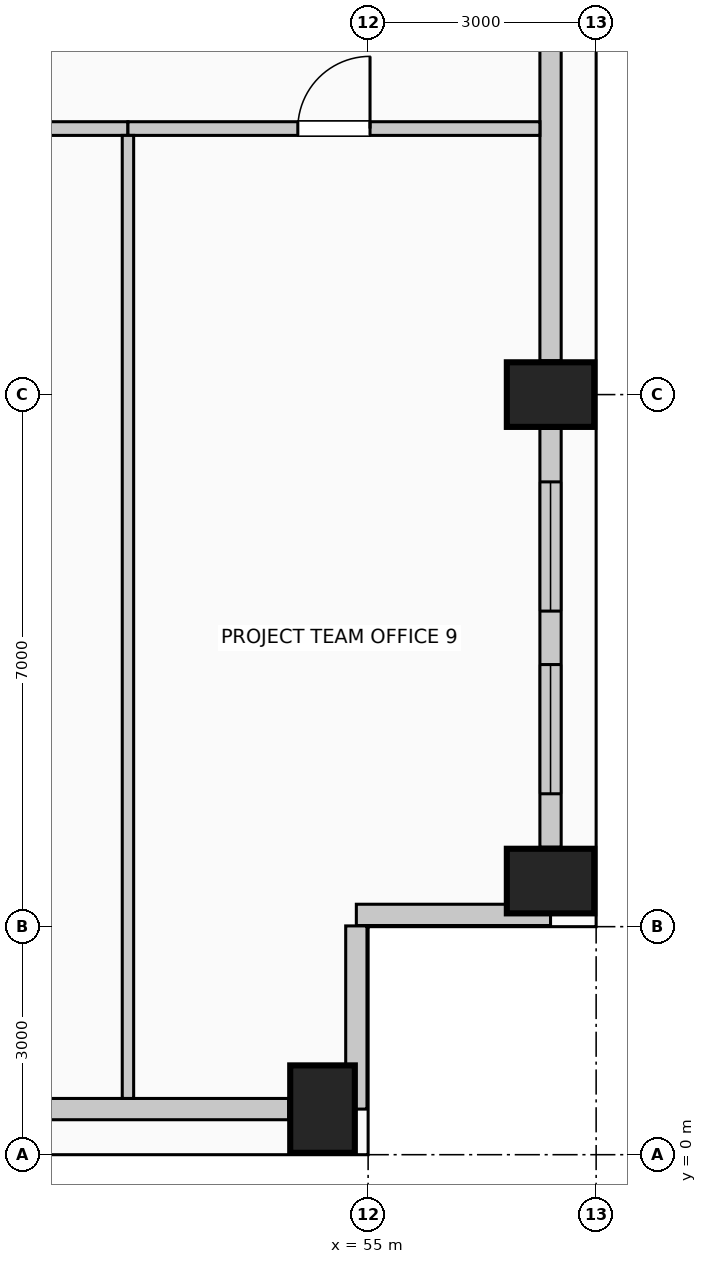
"""IFC4 building model, lengths in metres.
Left out: names, types, materials, properties, quantities, classifications, styles, units other than length and angle.
Written with IfcOpenShell. Run it as: python <this file> out.ifc"""

import sys

from ifc_helpers import new_model, si_unit, direction, frame, frame_2d, origin, origin_2d, place, context, subcontext, project, spatial, rectangle, extrude, element, fill, save


model = new_model("IFC4")
c1 = context("Model", 3, precision=1e-05, world=origin(), true_north=direction((0.0, 1.0)))
c2 = subcontext(c1, "Body", "Model", "MODEL_VIEW")
j1 = project(units=[si_unit("LENGTHUNIT", "METRE"), si_unit("PLANEANGLEUNIT", "RADIAN")], contexts=[c1])
p1 = place(None, origin())
s1 = spatial("IfcSite", under=j1, at=p1, CompositionType="ELEMENT")
p2 = place(p1, origin())
s2 = spatial("IfcBuilding", under=s1, at=p2, CompositionType="ELEMENT")
p3 = place(p2, frame((0.0, 0.0, 152.6)))
s3 = spatial("IfcBuildingStorey", under=s2, at=p3, CompositionType="ELEMENT", Elevation=152.6)
for number, where, z_axis, x_axis in (
    (1, (54.4, 0.6, 0.0), (0.0, 0.0, 1.0), (1.0, 0.0, 0.0)),
    (2, (57.4, 3.6, 0.0), (0.0, 0.0, 1.0), (0.0, 1.0, 0.0)),
    (3, (57.4, 10.0, 0.0), (0.0, 0.0, 1.0), (0.0, 1.0, 0.0)),
):
    element("IfcColumn", number, at=place(p3, frame(where, z_axis=z_axis, x_axis=x_axis)), inside=s3, PredefinedType="COLUMN", context=c2, shape_type="SweptSolid", body=[
        extrude(rectangle(XDim=0.85, YDim=1.15, at=origin_2d()), origin(), (0.0, 0.0, 1.0), 4.0),
    ])
p4 = place(p3, frame((53.955, 0.6, 0.0), z_axis=(0.0, 0.0, 1.0), x_axis=(-1.0, 0.0, 0.0)))
e4 = element("IfcWall", 4, at=p4, inside=s3, PredefinedType="SOLIDWALL", context=c2, shape_type="SweptSolid", body=[
    extrude(rectangle(XDim=4.01, YDim=0.28, at=frame_2d((2.005, 0.0))), origin(), (0.0, 0.0, 1.0), 2.875),
])
p5 = place(p3, frame((57.4, 9.555, 0.0), z_axis=(0.0, 0.0, 1.0), x_axis=(0.0, -1.0, 0.0)))
e5 = element("IfcWall", 5, at=p5, inside=s3, PredefinedType="SOLIDWALL", context=c2, shape_type="SweptSolid", body=[
    extrude(rectangle(XDim=5.51, YDim=0.28, at=frame_2d((2.755, 0.0))), origin(), (0.0, 0.0, 1.0), 2.875),
])
p6 = place(p5, frame((0.703, 0.0, 0.5)))
e6 = element("IfcOpeningElement", 6, at=p6, cuts=e5, PredefinedType="OPENING", context=c2, shape_type="SweptSolid", body=[
    extrude(rectangle(XDim=1.7, YDim=1.95, at=frame_2d((0.85, 0.975))), frame((0.0, 0.15, 0.0), z_axis=(0.0, -1.0, 0.0), x_axis=(1.0, 0.0, 0.0)), (0.0, 0.0, 1.0), 0.3),
])
p7 = place(p5, frame((3.107, 0.0, 0.5)))
e7 = element("IfcOpeningElement", 7, at=p7, cuts=e5, PredefinedType="OPENING", context=c2, shape_type="SweptSolid", body=[
    extrude(rectangle(XDim=1.7, YDim=1.95, at=frame_2d((0.85, 0.975))), frame((0.0, 0.15, 0.0), z_axis=(0.0, -1.0, 0.0), x_axis=(1.0, 0.0, 0.0)), (0.0, 0.0, 1.0), 0.3),
])
p8 = place(p3, frame((57.4, 17.555, 0.0), z_axis=(0.0, 0.0, 1.0), x_axis=(0.0, -1.0, 0.0)))
e8 = element("IfcWall", 8, at=p8, inside=s3, PredefinedType="SOLIDWALL", context=c2, shape_type="SweptSolid", body=[
    extrude(rectangle(XDim=7.11, YDim=0.28, at=frame_2d((3.555, 0.0))), origin(), (0.0, 0.0, 1.0), 2.875),
])
p9 = place(p3, frame((57.4, 3.155, 0.0), z_axis=(0.0, 0.0, 1.0), x_axis=(-1.0, 0.0, 0.0)))
e9 = element("IfcWall", 9, at=p9, inside=s3, PredefinedType="SOLIDWALL", context=c2, shape_type="SweptSolid", body=[
    extrude(rectangle(XDim=2.555, YDim=0.28, at=frame_2d((1.277, 0.0))), origin(), (0.0, 0.0, 1.0), 3.725),
])
p10 = place(p3, frame((54.845, 3.01, 0.0), z_axis=(0.0, 0.0, 1.0), x_axis=(0.0, -1.0, 0.0)))
e10 = element("IfcWall", 10, at=p10, inside=s3, PredefinedType="SOLIDWALL", context=c2, shape_type="SweptSolid", body=[
    extrude(rectangle(XDim=2.41, YDim=0.28, at=frame_2d((1.205, 0.0))), origin(), (0.0, 0.0, 1.0), 3.725),
])
p11 = place(p3, frame((44.64, 13.5, 0.0), z_axis=(0.0, 0.0, 1.0), x_axis=(1.0, 0.0, 0.0)))
e11 = element("IfcWall", 11, at=p11, inside=s3, PredefinedType="PARTITIONING", context=c2, shape_type="SweptSolid", body=[
    extrude(rectangle(XDim=7.2, YDim=0.18, at=frame_2d((3.6, 0.0))), origin(), (0.0, 0.0, 1.0), 3.725),
])
p12 = place(p11, frame((3.075, 0.0, 0.0)))
e12 = element("IfcOpeningElement", 12, at=p12, cuts=e11, PredefinedType="OPENING", context=c2, shape_type="SweptSolid", body=[
    extrude(rectangle(XDim=1.05, YDim=2.15, at=frame_2d((0.525, 1.075))), frame((0.0, 0.1, 0.0), z_axis=(0.0, -1.0, 0.0), x_axis=(1.0, 0.0, 0.0)), (0.0, 0.0, 1.0), 0.2),
])
p13 = place(p3, frame((51.84, 13.5, 0.0), z_axis=(0.0, 0.0, 1.0), x_axis=(1.0, 0.0, 0.0)))
e13 = element("IfcWall", 13, at=p13, inside=s3, PredefinedType="PARTITIONING", context=c2, shape_type="SweptSolid", body=[
    extrude(rectangle(XDim=5.42, YDim=0.18, at=frame_2d((2.71, 0.0))), origin(), (0.0, 0.0, 1.0), 3.725),
])
p14 = place(p13, frame((2.235, 0.0, 0.0)))
e14 = element("IfcOpeningElement", 14, at=p14, cuts=e13, PredefinedType="OPENING", context=c2, shape_type="SweptSolid", body=[
    extrude(rectangle(XDim=0.95, YDim=2.15, at=frame_2d((0.475, 1.075))), frame((0.0, 0.1, 0.0), z_axis=(0.0, -1.0, 0.0), x_axis=(1.0, 0.0, 0.0)), (0.0, 0.0, 1.0), 0.2),
])
p15 = place(p3, frame((51.84, 0.74, 0.0), z_axis=(0.0, 0.0, 1.0), x_axis=(0.0, 1.0, 0.0)))
e15 = element("IfcWall", 15, at=p15, inside=s3, PredefinedType="PARTITIONING", context=c2, shape_type="SweptSolid", body=[
    extrude(rectangle(XDim=12.67, YDim=0.15, at=frame_2d((6.335, 0.0))), origin(), (0.0, 0.0, 1.0), 3.725),
])
p16 = place(p6, origin())
e16 = element("IfcWindow", 16, at=p16, inside=s3, PartitioningType="SINGLE_PANEL", PredefinedType="WINDOW", context=c2, shape_type="SweptSolid", body=[
    extrude(rectangle(XDim=1.7, YDim=1.95, at=frame_2d((0.85, 0.975))), frame((0.0, 0.03, 0.0), z_axis=(0.0, -1.0, 0.0), x_axis=(1.0, 0.0, 0.0)), (0.0, 0.0, 1.0), 0.06),
])
fill(e6, e16)
p17 = place(p7, origin())
e17 = element("IfcWindow", 17, at=p17, inside=s3, PartitioningType="SINGLE_PANEL", PredefinedType="WINDOW", context=c2, shape_type="SweptSolid", body=[
    extrude(rectangle(XDim=1.7, YDim=1.95, at=frame_2d((0.85, 0.975))), frame((0.0, 0.03, 0.0), z_axis=(0.0, -1.0, 0.0), x_axis=(1.0, 0.0, 0.0)), (0.0, 0.0, 1.0), 0.06),
])
fill(e7, e17)
p18 = place(p14, origin())
e18 = element("IfcDoor", 18, at=p18, inside=s3, OperationType="SINGLE_SWING_RIGHT", PredefinedType="DOOR", context=c2, shape_type="SweptSolid", body=[
    extrude(rectangle(XDim=0.95, YDim=2.15, at=frame_2d((0.475, 1.075))), frame((0.0, 0.025, 0.0), z_axis=(0.0, -1.0, 0.0), x_axis=(1.0, 0.0, 0.0)), (0.0, 0.0, 1.0), 0.05),
])
fill(e14, e18)
save(model, sys.argv[1])
